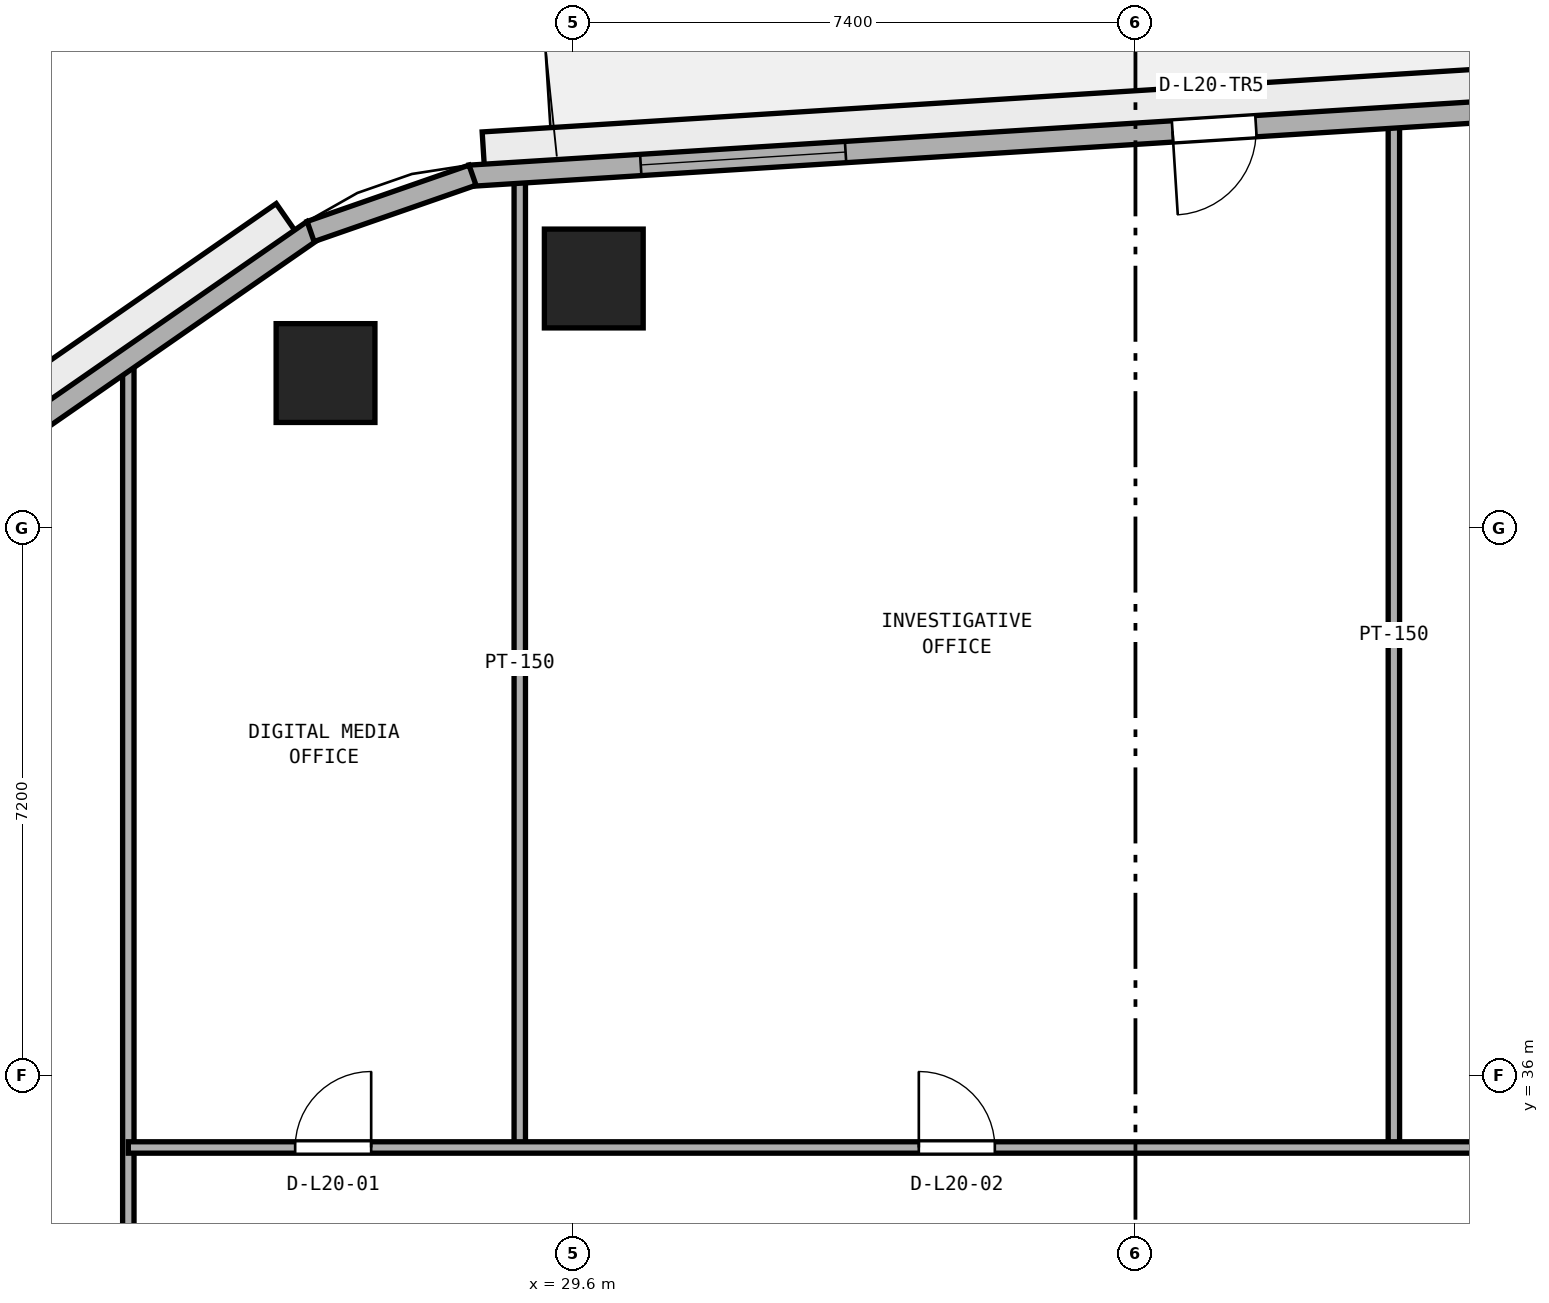
"""IFC4 building model, lengths in metres.
Left out: names, types, materials, properties, quantities, classifications, styles, units other than length and angle.
Written with IfcOpenShell. Run it as: python <this file> out.ifc"""

import sys

from ifc_helpers import new_model, si_unit, direction, frame, frame_2d, origin, origin_2d, place, context, subcontext, project, spatial, rectangle, extrude, element, fill, save


model = new_model("IFC4")
c1 = context("Model", 3, precision=1e-05, world=origin(), true_north=direction((0.0, 1.0)))
c2 = subcontext(c1, "Body", "Model", "MODEL_VIEW")
j1 = project(units=[si_unit("LENGTHUNIT", "METRE"), si_unit("PLANEANGLEUNIT", "RADIAN")], contexts=[c1])
p1 = place(None, origin())
s1 = spatial("IfcSite", under=j1, at=p1, CompositionType="ELEMENT")
p2 = place(p1, origin())
s2 = spatial("IfcBuilding", under=s1, at=p2, CompositionType="ELEMENT")
p3 = place(p2, frame((0.0, 0.0, 82.0)))
s3 = spatial("IfcBuildingStorey", under=s2, at=p3, CompositionType="ELEMENT", Elevation=82.0)
for number, where, z_axis, x_axis in (
    (1, (29.874, 46.482, 0.0), (0.0, 0.0, 1.0), (1.0, 0.0, 0.0)),
    (2, (26.344, 45.238, 0.0), (0.0, 0.0, 1.0), (1.0, 0.0, 0.0)),
):
    element("IfcColumn", number, at=place(p3, frame(where, z_axis=z_axis, x_axis=x_axis)), inside=s3, PredefinedType="COLUMN", context=c2, shape_type="SweptSolid", body=[
        extrude(rectangle(XDim=1.3, YDim=1.3, at=origin_2d()), origin(), (0.0, 0.0, 1.0), 3.8),
    ])
p4 = place(p3, frame((40.4, 35.05, 0.0), z_axis=(0.0, 0.0, 1.0), x_axis=(0.0, 1.0, 0.0)))
e3 = element("IfcWall", 3, at=p4, inside=s3, PredefinedType="PARTITIONING", context=c2, shape_type="SweptSolid", body=[
    extrude(rectangle(XDim=13.486, YDim=0.15, at=frame_2d((6.743, 0.0))), origin(), (0.0, 0.0, 1.0), 3.525),
])
p5 = place(p3, frame((28.9, 35.05, 0.0), z_axis=(0.0, 0.0, 1.0), x_axis=(0.0, 1.0, 0.0)))
e4 = element("IfcWall", 4, at=p5, inside=s3, PredefinedType="PARTITIONING", context=c2, shape_type="SweptSolid", body=[
    extrude(rectangle(XDim=12.761, YDim=0.15, at=frame_2d((6.38, 0.0))), origin(), (0.0, 0.0, 1.0), 3.525),
])
p6 = place(p3, frame((23.75, 4.769, 0.0), z_axis=(0.0, 0.0, 1.0), x_axis=(0.0, 1.0, 0.0)))
e5 = element("IfcWall", 5, at=p6, inside=s3, PredefinedType="PARTITIONING", context=c2, shape_type="SweptSolid", body=[
    extrude(rectangle(XDim=40.691, YDim=0.15, at=frame_2d((20.345, 0.0))), origin(), (0.0, 0.0, 1.0), 3.525),
])
p7 = place(p6, frame((14.006, 0.0, 0.0)))
e6 = element("IfcOpeningElement", 6, at=p7, cuts=e5, PredefinedType="OPENING", context=c2, shape_type="SweptSolid", body=[
    extrude(rectangle(XDim=0.9, YDim=2.1, at=frame_2d((0.45, 1.05))), frame((0.0, 0.085, 0.0), z_axis=(0.0, -1.0, 0.0), x_axis=(1.0, 0.0, 0.0)), (0.0, 0.0, 1.0), 0.17),
])
p8 = place(p6, frame((21.181, 0.0, 0.0)))
e7 = element("IfcOpeningElement", 7, at=p8, cuts=e5, PredefinedType="OPENING", context=c2, shape_type="SweptSolid", body=[
    extrude(rectangle(XDim=0.9, YDim=2.1, at=frame_2d((0.45, 1.05))), frame((0.0, 0.085, 0.0), z_axis=(0.0, -1.0, 0.0), x_axis=(1.0, 0.0, 0.0)), (0.0, 0.0, 1.0), 0.17),
])
p9 = place(p6, frame((27.156, 0.0, 0.0)))
e8 = element("IfcOpeningElement", 8, at=p9, cuts=e5, PredefinedType="OPENING", context=c2, shape_type="SweptSolid", body=[
    extrude(rectangle(XDim=0.9, YDim=2.1, at=frame_2d((0.45, 1.05))), frame((0.0, 0.085, 0.0), z_axis=(0.0, -1.0, 0.0), x_axis=(1.0, 0.0, 0.0)), (0.0, 0.0, 1.0), 0.17),
])
p10 = place(p3, frame((23.75, 35.05, 0.0), z_axis=(0.0, 0.0, 1.0), x_axis=(1.0, 0.0, 0.0)))
e9 = element("IfcWall", 9, at=p10, inside=s3, PredefinedType="PARTITIONING", context=c2, shape_type="SweptSolid", body=[
    extrude(rectangle(XDim=26.5, YDim=0.15, at=frame_2d((13.25, 0.0))), origin(), (0.0, 0.0, 1.0), 3.525),
])
p11 = place(p10, frame((2.195, 0.0, 0.0)))
e10 = element("IfcOpeningElement", 10, at=p11, cuts=e9, PredefinedType="OPENING", context=c2, shape_type="SweptSolid", body=[
    extrude(rectangle(XDim=1.0, YDim=2.12, at=frame_2d((0.5, 1.06))), frame((0.0, 0.085, 0.0), z_axis=(0.0, -1.0, 0.0), x_axis=(1.0, 0.0, 0.0)), (0.0, 0.0, 1.0), 0.17),
])
p12 = place(p10, frame((10.4, 0.0, 0.0)))
e11 = element("IfcOpeningElement", 11, at=p12, cuts=e9, PredefinedType="OPENING", context=c2, shape_type="SweptSolid", body=[
    extrude(rectangle(XDim=1.0, YDim=2.12, at=frame_2d((0.5, 1.06))), frame((0.0, 0.085, 0.0), z_axis=(0.0, -1.0, 0.0), x_axis=(1.0, 0.0, 0.0)), (0.0, 0.0, 1.0), 0.17),
])
p13 = place(p10, frame((21.005, 0.0, 0.0)))
e12 = element("IfcOpeningElement", 12, at=p13, cuts=e9, PredefinedType="OPENING", context=c2, shape_type="SweptSolid", body=[
    extrude(rectangle(XDim=0.9, YDim=2.1, at=frame_2d((0.45, 1.05))), frame((0.0, 0.085, 0.0), z_axis=(0.0, -1.0, 0.0), x_axis=(1.0, 0.0, 0.0)), (0.0, 0.0, 1.0), 0.17),
])
p14 = place(p3, frame((47.832, 49.069, 0.0), z_axis=(0.0, 0.0, 1.0), x_axis=(-0.998017725054, -0.062933460723, 0.0)))
e13 = element("IfcWall", 13, at=p14, inside=s3, PredefinedType="STANDARD", context=c2, shape_type="SweptSolid", body=[
    extrude(rectangle(XDim=19.629, YDim=0.28, at=frame_2d((9.815, 0.0))), origin(), (0.0, 0.0, 1.0), 3.525),
])
p15 = place(p14, frame((9.265, 0.0, 0.0)))
e14 = element("IfcOpeningElement", 14, at=p15, cuts=e13, PredefinedType="OPENING", context=c2, shape_type="SweptSolid", body=[
    extrude(rectangle(XDim=1.1, YDim=2.2, at=frame_2d((0.55, 1.1))), frame((0.0, 0.15, 0.0), z_axis=(0.0, -1.0, 0.0), x_axis=(1.0, 0.0, 0.0)), (0.0, 0.0, 1.0), 0.3),
])
p16 = place(p14, frame((2.255, 0.0, 0.9)))
e15 = element("IfcOpeningElement", 15, at=p16, cuts=e13, PredefinedType="OPENING", context=c2, shape_type="SweptSolid", body=[
    extrude(rectangle(XDim=2.7, YDim=1.75, at=frame_2d((1.35, 0.875))), frame((0.0, 0.15, 0.0), z_axis=(0.0, -1.0, 0.0), x_axis=(1.0, 0.0, 0.0)), (0.0, 0.0, 1.0), 0.3),
])
p17 = place(p14, frame((14.675, 0.0, 0.9)))
e16 = element("IfcOpeningElement", 16, at=p17, cuts=e13, PredefinedType="OPENING", context=c2, shape_type="SweptSolid", body=[
    extrude(rectangle(XDim=2.7, YDim=1.75, at=frame_2d((1.35, 0.875))), frame((0.0, 0.15, 0.0), z_axis=(0.0, -1.0, 0.0), x_axis=(1.0, 0.0, 0.0)), (0.0, 0.0, 1.0), 0.3),
])
p18 = place(p3, frame((26.182, 47.118, 0.0), z_axis=(0.0, 0.0, 1.0), x_axis=(-0.821547956627, -0.570139417127, 0.0)))
e17 = element("IfcWall", 17, at=p18, inside=s3, PredefinedType="STANDARD", context=c2, shape_type="SweptSolid", body=[
    extrude(rectangle(XDim=18.132, YDim=0.28, at=frame_2d((9.066, 0.0))), origin(), (0.0, 0.0, 1.0), 3.525),
])
p19 = place(p18, frame((7.716, 0.0, 0.9)))
e18 = element("IfcOpeningElement", 18, at=p19, cuts=e17, PredefinedType="OPENING", context=c2, shape_type="SweptSolid", body=[
    extrude(rectangle(XDim=2.7, YDim=1.75, at=frame_2d((1.35, 0.875))), frame((0.0, 0.15, 0.0), z_axis=(0.0, -1.0, 0.0), x_axis=(1.0, 0.0, 0.0)), (0.0, 0.0, 1.0), 0.3),
])
p20 = place(p18, frame((13.427, 0.0, 0.9)))
e19 = element("IfcOpeningElement", 19, at=p20, cuts=e17, PredefinedType="OPENING", context=c2, shape_type="SweptSolid", body=[
    extrude(rectangle(XDim=2.7, YDim=1.75, at=frame_2d((1.35, 0.875))), frame((0.0, 0.15, 0.0), z_axis=(0.0, -1.0, 0.0), x_axis=(1.0, 0.0, 0.0)), (0.0, 0.0, 1.0), 0.3),
])
p21 = place(p3, frame((28.278, 47.842, 0.0), z_axis=(0.0, 0.0, 1.0), x_axis=(-0.9444559001, -0.328638179106, 0.0)))
e20 = element("IfcWall", 20, at=p21, inside=s3, PredefinedType="STANDARD", context=c2, shape_type="SweptSolid", body=[
    extrude(rectangle(XDim=2.255, YDim=0.28, at=frame_2d((1.128, 0.0))), origin(), (0.0, 0.0, 1.0), 3.525),
])
p22 = place(p11, origin())
e21 = element("IfcDoor", 21, at=p22, inside=s3, OperationType="SINGLE_SWING_RIGHT", PredefinedType="DOOR", context=c2, shape_type="SweptSolid", body=[
    extrude(rectangle(XDim=1.0, YDim=2.12, at=frame_2d((0.5, 1.06))), frame((0.0, 0.025, 0.0), z_axis=(0.0, -1.0, 0.0), x_axis=(1.0, 0.0, 0.0)), (0.0, 0.0, 1.0), 0.05),
])
fill(e10, e21)
p23 = place(p12, origin())
e22 = element("IfcDoor", 22, at=p23, inside=s3, OperationType="SINGLE_SWING_LEFT", PredefinedType="DOOR", context=c2, shape_type="SweptSolid", body=[
    extrude(rectangle(XDim=1.0, YDim=2.12, at=frame_2d((0.5, 1.06))), frame((0.0, 0.025, 0.0), z_axis=(0.0, -1.0, 0.0), x_axis=(1.0, 0.0, 0.0)), (0.0, 0.0, 1.0), 0.05),
])
fill(e11, e22)
p24 = place(p15, origin())
e23 = element("IfcDoor", 23, at=p24, inside=s3, OperationType="SINGLE_SWING_RIGHT", PredefinedType="DOOR", context=c2, shape_type="SweptSolid", body=[
    extrude(rectangle(XDim=1.1, YDim=2.2, at=frame_2d((0.55, 1.1))), frame((0.0, 0.025, 0.0), z_axis=(0.0, -1.0, 0.0), x_axis=(1.0, 0.0, 0.0)), (0.0, 0.0, 1.0), 0.05),
])
fill(e14, e23)
p25 = place(p17, origin())
e24 = element("IfcWindow", 24, at=p25, inside=s3, PartitioningType="SINGLE_PANEL", PredefinedType="WINDOW", context=c2, shape_type="SweptSolid", body=[
    extrude(rectangle(XDim=2.7, YDim=1.75, at=frame_2d((1.35, 0.875))), frame((0.0, 0.03, 0.0), z_axis=(0.0, -1.0, 0.0), x_axis=(1.0, 0.0, 0.0)), (0.0, 0.0, 1.0), 0.06),
])
fill(e16, e24)
save(model, sys.argv[1])
